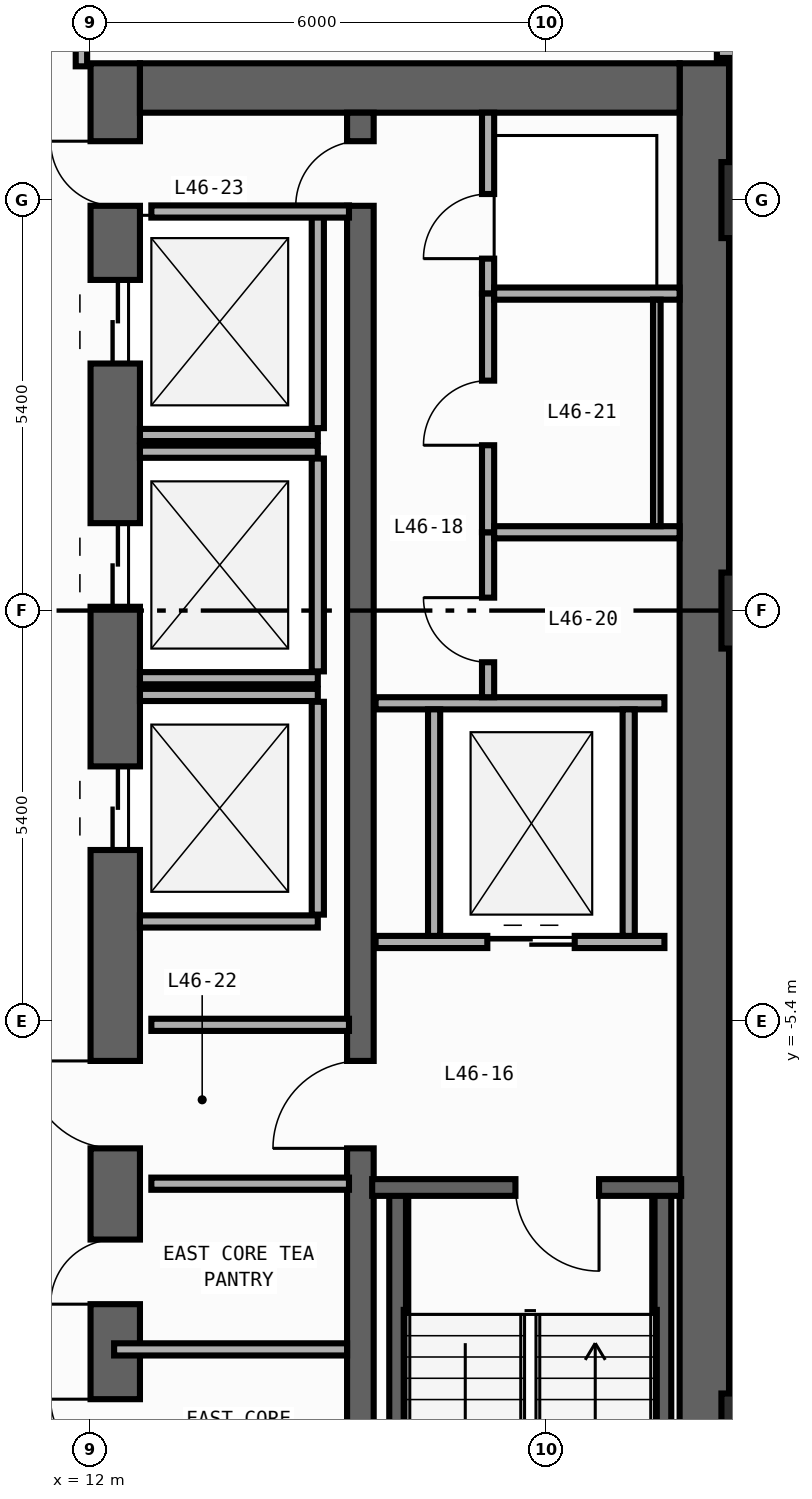
"""IFC4 building model, lengths in metres.
Left out: names, types, materials, properties, quantities, classifications, styles, units other than length and angle.
Written with IfcOpenShell. Run it as: python <this file> out.ifc"""

import sys

from ifc_helpers import new_model, si_unit, direction, frame, frame_2d, origin, origin_2d, place, context, subcontext, project, spatial, rectangle, extrude, element, fill, save


model = new_model("IFC4")
c1 = context("Model", 3, precision=1e-05, world=origin(), true_north=direction((0.0, 1.0)))
c2 = subcontext(c1, "Body", "Model", "MODEL_VIEW")
j1 = project(units=[si_unit("LENGTHUNIT", "METRE"), si_unit("PLANEANGLEUNIT", "RADIAN")], contexts=[c1])
p1 = place(None, origin())
s1 = spatial("IfcSite", under=j1, at=p1, CompositionType="ELEMENT")
p2 = place(p1, origin())
s2 = spatial("IfcBuilding", under=s1, at=p2, CompositionType="ELEMENT")
p3 = place(p2, frame((0.0, 0.0, 199.2)))
s3 = spatial("IfcBuildingStorey", under=s2, at=p3, CompositionType="ELEMENT", Elevation=199.2)
p4 = place(p3, frame((12.325, -19.8, 0.0), z_axis=(0.0, 0.0, 1.0), x_axis=(0.0, 1.0, 0.0)))
e1 = element("IfcWall", 1, at=p4, inside=s3, PredefinedType="SHEAR", context=c2, shape_type="SweptSolid", body=[
    extrude(rectangle(XDim=27.0, YDim=0.65, at=frame_2d((13.5, 0.0))), origin(), (0.0, 0.0, 1.0), 3.54),
])
p5 = place(p4, frame((23.05, 0.0, 0.0)))
e2 = element("IfcOpeningElement", 2, at=p5, cuts=e1, PredefinedType="OPENING", context=c2, shape_type="SweptSolid", body=[
    extrude(rectangle(XDim=1.1, YDim=2.2, at=frame_2d((0.55, 1.1))), frame((0.0, 0.335, 0.0), z_axis=(0.0, -1.0, 0.0), x_axis=(1.0, 0.0, 0.0)), (0.0, 0.0, 1.0), 0.67),
])
p6 = place(p4, frame((19.85, 0.0, 0.0)))
e3 = element("IfcOpeningElement", 3, at=p6, cuts=e1, PredefinedType="OPENING", context=c2, shape_type="SweptSolid", body=[
    extrude(rectangle(XDim=1.1, YDim=2.2, at=frame_2d((0.55, 1.1))), frame((0.0, 0.335, 0.0), z_axis=(0.0, -1.0, 0.0), x_axis=(1.0, 0.0, 0.0)), (0.0, 0.0, 1.0), 0.67),
])
p7 = place(p4, frame((16.65, 0.0, 0.0)))
e4 = element("IfcOpeningElement", 4, at=p7, cuts=e1, PredefinedType="OPENING", context=c2, shape_type="SweptSolid", body=[
    extrude(rectangle(XDim=1.1, YDim=2.2, at=frame_2d((0.55, 1.1))), frame((0.0, 0.335, 0.0), z_axis=(0.0, -1.0, 0.0), x_axis=(1.0, 0.0, 0.0)), (0.0, 0.0, 1.0), 0.67),
])
p8 = place(p4, frame((6.275, 0.0, 0.0)))
e5 = element("IfcOpeningElement", 5, at=p8, cuts=e1, PredefinedType="OPENING", context=c2, shape_type="SweptSolid", body=[
    extrude(rectangle(XDim=0.85, YDim=2.1, at=frame_2d((0.425, 1.05))), frame((0.0, 0.335, 0.0), z_axis=(0.0, -1.0, 0.0), x_axis=(1.0, 0.0, 0.0)), (0.0, 0.0, 1.0), 0.67),
])
p9 = place(p4, frame((8.575, 0.0, 0.0)))
e6 = element("IfcOpeningElement", 6, at=p9, cuts=e1, PredefinedType="OPENING", context=c2, shape_type="SweptSolid", body=[
    extrude(rectangle(XDim=0.85, YDim=2.1, at=frame_2d((0.425, 1.05))), frame((0.0, 0.335, 0.0), z_axis=(0.0, -1.0, 0.0), x_axis=(1.0, 0.0, 0.0)), (0.0, 0.0, 1.0), 0.67),
])
p10 = place(p4, frame((10.675, 0.0, 0.0)))
e7 = element("IfcOpeningElement", 7, at=p10, cuts=e1, PredefinedType="OPENING", context=c2, shape_type="SweptSolid", body=[
    extrude(rectangle(XDim=0.85, YDim=2.1, at=frame_2d((0.425, 1.05))), frame((0.0, 0.335, 0.0), z_axis=(0.0, -1.0, 0.0), x_axis=(1.0, 0.0, 0.0)), (0.0, 0.0, 1.0), 0.67),
])
p11 = place(p4, frame((12.725, 0.0, 0.0)))
e8 = element("IfcOpeningElement", 8, at=p11, cuts=e1, PredefinedType="OPENING", context=c2, shape_type="SweptSolid", body=[
    extrude(rectangle(XDim=1.15, YDim=2.2, at=frame_2d((0.575, 1.1))), frame((0.0, 0.335, 0.0), z_axis=(0.0, -1.0, 0.0), x_axis=(1.0, 0.0, 0.0)), (0.0, 0.0, 1.0), 0.67),
])
p12 = place(p4, frame((25.125, 0.0, 0.0)))
e9 = element("IfcOpeningElement", 9, at=p12, cuts=e1, PredefinedType="OPENING", context=c2, shape_type="SweptSolid", body=[
    extrude(rectangle(XDim=0.85, YDim=2.1, at=frame_2d((0.425, 1.05))), frame((0.0, 0.335, 0.0), z_axis=(0.0, -1.0, 0.0), x_axis=(1.0, 0.0, 0.0)), (0.0, 0.0, 1.0), 0.67),
])
p13 = place(p3, frame((20.075, -19.8, 0.0), z_axis=(0.0, 0.0, 1.0), x_axis=(0.0, 1.0, 0.0)))
e10 = element("IfcWall", 10, at=p13, inside=s3, PredefinedType="SHEAR", context=c2, shape_type="SweptSolid", body=[
    extrude(rectangle(XDim=27.0, YDim=0.65, at=frame_2d((13.5, 0.0))), origin(), (0.0, 0.0, 1.0), 3.54),
])
p14 = place(p3, frame((12.65, 6.875, 0.0), z_axis=(0.0, 0.0, 1.0), x_axis=(1.0, 0.0, 0.0)))
e11 = element("IfcWall", 11, at=p14, inside=s3, PredefinedType="SHEAR", context=c2, shape_type="SweptSolid", body=[
    extrude(rectangle(XDim=7.1, YDim=0.65, at=frame_2d((3.55, 0.0))), origin(), (0.0, 0.0, 1.0), 3.54),
])
p15 = place(p3, frame((15.55, -19.15, 0.0), z_axis=(0.0, 0.0, 1.0), x_axis=(0.0, 1.0, 0.0)))
e12 = element("IfcWall", 12, at=p15, inside=s3, PredefinedType="SHEAR", context=c2, shape_type="SweptSolid", body=[
    extrude(rectangle(XDim=25.7, YDim=0.35, at=frame_2d((12.85, 0.0))), origin(), (0.0, 0.0, 1.0), 3.54),
])
p16 = place(p15, frame((12.075, 0.0, 0.0)))
e13 = element("IfcOpeningElement", 13, at=p16, cuts=e12, PredefinedType="OPENING", context=c2, shape_type="SweptSolid", body=[
    extrude(rectangle(XDim=1.15, YDim=2.2, at=frame_2d((0.575, 1.1))), frame((0.0, 0.185, 0.0), z_axis=(0.0, -1.0, 0.0), x_axis=(1.0, 0.0, 0.0)), (0.0, 0.0, 1.0), 0.37),
])
p17 = place(p15, frame((24.475, 0.0, 0.0)))
e14 = element("IfcOpeningElement", 14, at=p17, cuts=e12, PredefinedType="OPENING", context=c2, shape_type="SweptSolid", body=[
    extrude(rectangle(XDim=0.85, YDim=2.1, at=frame_2d((0.425, 1.05))), frame((0.0, 0.185, 0.0), z_axis=(0.0, -1.0, 0.0), x_axis=(1.0, 0.0, 0.0)), (0.0, 0.0, 1.0), 0.37),
])
for number, where, z_axis, x_axis in (
    (15, (16.04, -19.01, 0.0), (0.0, 0.0, 1.0), (0.0, 1.0, 0.0)),
    (16, (19.53, -19.01, 0.0), (0.0, 0.0, 1.0), (0.0, 1.0, 0.0)),
):
    element("IfcWall", number, at=place(p3, frame(where, z_axis=z_axis, x_axis=x_axis)), inside=s3, PredefinedType="SHEAR", context=c2, shape_type="SweptSolid", body=[
        extrude(rectangle(XDim=11.42, YDim=0.22, at=frame_2d((5.71, 0.0))), origin(), (0.0, 0.0, 1.0), 3.54),
    ])
p18 = place(p3, frame((19.77, -7.59, 0.0), z_axis=(0.0, 0.0, 1.0), x_axis=(-1.0, 0.0, 0.0)))
e17 = element("IfcWall", 17, at=p18, inside=s3, PredefinedType="SHEAR", context=c2, shape_type="SweptSolid", body=[
    extrude(rectangle(XDim=4.065, YDim=0.22, at=frame_2d((2.032, 0.0))), origin(), (0.0, 0.0, 1.0), 3.54),
])
p19 = place(p18, frame((1.08, 0.0, 0.0)))
e18 = element("IfcOpeningElement", 18, at=p19, cuts=e17, PredefinedType="OPENING", context=c2, shape_type="SweptSolid", body=[
    extrude(rectangle(XDim=1.1, YDim=2.2, at=frame_2d((0.55, 1.1))), frame((0.0, 0.12, 0.0), z_axis=(0.0, -1.0, 0.0), x_axis=(1.0, 0.0, 0.0)), (0.0, 0.0, 1.0), 0.24),
])
for number, where, z_axis, x_axis in (
    (19, (20.8, -10.8, 0.0), (0.0, 0.0, 1.0), (1.0, 0.0, 0.0)),
    (20, (20.8, 0.0, 0.0), (0.0, 0.0, 1.0), (1.0, 0.0, 0.0)),
    (21, (20.8, 5.4, 0.0), (0.0, 0.0, 1.0), (1.0, 0.0, 0.0)),
):
    element("IfcColumn", number, at=place(p3, frame(where, z_axis=z_axis, x_axis=x_axis)), inside=s3, PredefinedType="COLUMN", context=c2, shape_type="SweptSolid", body=[
        extrude(rectangle(XDim=1.0, YDim=1.0, at=origin_2d()), origin(), (0.0, 0.0, 1.0), 3.8),
    ])
p20 = place(p3, frame((12.65, 2.31, 0.0), z_axis=(0.0, 0.0, 1.0), x_axis=(1.0, 0.0, 0.0)))
e22 = element("IfcWall", 22, at=p20, inside=s3, PredefinedType="STANDARD", context=c2, shape_type="SweptSolid", body=[
    extrude(rectangle(XDim=2.34, YDim=0.16, at=frame_2d((1.17, 0.0))), origin(), (0.0, 0.0, 1.0), 3.54),
])
p21 = place(p3, frame((14.99, 2.4, 0.0), z_axis=(0.0, 0.0, 1.0), x_axis=(0.0, 1.0, 0.0)))
e23 = element("IfcWall", 23, at=p21, inside=s3, PredefinedType="STANDARD", context=c2, shape_type="SweptSolid", body=[
    extrude(rectangle(XDim=2.8, YDim=0.16, at=frame_2d((1.4, 0.0))), origin(), (0.0, 0.0, 1.0), 3.54),
])
for number, where, z_axis, x_axis in (
    (24, (12.65, -0.89, 0.0), (0.0, 0.0, 1.0), (1.0, 0.0, 0.0)),
    (25, (12.65, 2.09, 0.0), (0.0, 0.0, 1.0), (1.0, 0.0, 0.0)),
):
    element("IfcWall", number, at=place(p3, frame(where, z_axis=z_axis, x_axis=x_axis)), inside=s3, PredefinedType="STANDARD", context=c2, shape_type="SweptSolid", body=[
        extrude(rectangle(XDim=2.34, YDim=0.16, at=frame_2d((1.17, 0.0))), origin(), (0.0, 0.0, 1.0), 3.54),
    ])
p22 = place(p3, frame((14.99, -0.8, 0.0), z_axis=(0.0, 0.0, 1.0), x_axis=(0.0, 1.0, 0.0)))
e26 = element("IfcWall", 26, at=p22, inside=s3, PredefinedType="STANDARD", context=c2, shape_type="SweptSolid", body=[
    extrude(rectangle(XDim=2.8, YDim=0.16, at=frame_2d((1.4, 0.0))), origin(), (0.0, 0.0, 1.0), 3.54),
])
for number, where, z_axis, x_axis in (
    (27, (12.65, -4.09, 0.0), (0.0, 0.0, 1.0), (1.0, 0.0, 0.0)),
    (28, (12.65, -1.11, 0.0), (0.0, 0.0, 1.0), (1.0, 0.0, 0.0)),
):
    element("IfcWall", number, at=place(p3, frame(where, z_axis=z_axis, x_axis=x_axis)), inside=s3, PredefinedType="STANDARD", context=c2, shape_type="SweptSolid", body=[
        extrude(rectangle(XDim=2.34, YDim=0.16, at=frame_2d((1.17, 0.0))), origin(), (0.0, 0.0, 1.0), 3.54),
    ])
p23 = place(p3, frame((14.99, -4.0, 0.0), z_axis=(0.0, 0.0, 1.0), x_axis=(0.0, 1.0, 0.0)))
e29 = element("IfcWall", 29, at=p23, inside=s3, PredefinedType="STANDARD", context=c2, shape_type="SweptSolid", body=[
    extrude(rectangle(XDim=2.8, YDim=0.16, at=frame_2d((1.4, 0.0))), origin(), (0.0, 0.0, 1.0), 3.54),
])
p24 = place(p3, frame((15.75, -4.36, 0.0), z_axis=(0.0, 0.0, 1.0), x_axis=(1.0, 0.0, 0.0)))
e30 = element("IfcWall", 30, at=p24, inside=s3, PredefinedType="STANDARD", context=c2, shape_type="SweptSolid", body=[
    extrude(rectangle(XDim=3.8, YDim=0.16, at=frame_2d((1.9, 0.0))), origin(), (0.0, 0.0, 1.0), 3.54),
])
p25 = place(p24, frame((1.47, 0.0, 0.0)))
e31 = element("IfcOpeningElement", 31, at=p25, cuts=e30, PredefinedType="OPENING", context=c2, shape_type="SweptSolid", body=[
    extrude(rectangle(XDim=1.15, YDim=2.2, at=frame_2d((0.575, 1.1))), frame((0.0, 0.09, 0.0), z_axis=(0.0, -1.0, 0.0), x_axis=(1.0, 0.0, 0.0)), (0.0, 0.0, 1.0), 0.18),
])
p26 = place(p3, frame((15.75, -1.22, 0.0), z_axis=(0.0, 0.0, 1.0), x_axis=(1.0, 0.0, 0.0)))
e32 = element("IfcWall", 32, at=p26, inside=s3, PredefinedType="STANDARD", context=c2, shape_type="SweptSolid", body=[
    extrude(rectangle(XDim=3.8, YDim=0.16, at=frame_2d((1.9, 0.0))), origin(), (0.0, 0.0, 1.0), 3.54),
])
for number, where, z_axis, x_axis in (
    (33, (16.52, -4.28, 0.0), (0.0, 0.0, 1.0), (0.0, 1.0, 0.0)),
    (34, (19.08, -4.28, 0.0), (0.0, 0.0, 1.0), (0.0, 1.0, 0.0)),
):
    element("IfcWall", number, at=place(p3, frame(where, z_axis=z_axis, x_axis=x_axis)), inside=s3, PredefinedType="STANDARD", context=c2, shape_type="SweptSolid", body=[
        extrude(rectangle(XDim=2.98, YDim=0.16, at=frame_2d((1.49, 0.0))), origin(), (0.0, 0.0, 1.0), 3.54),
    ])
for number, where, z_axis, x_axis in (
    (35, (12.8, -5.45, 0.0), (0.0, 0.0, 1.0), (1.0, 0.0, 0.0)),
    (36, (12.8, -7.54, 0.0), (0.0, 0.0, 1.0), (1.0, 0.0, 0.0)),
    (37, (12.8, 5.25, 0.0), (0.0, 0.0, 1.0), (1.0, 0.0, 0.0)),
):
    element("IfcWall", number, at=place(p3, frame(where, z_axis=z_axis, x_axis=x_axis)), inside=s3, PredefinedType="STANDARD", context=c2, shape_type="SweptSolid", body=[
        extrude(rectangle(XDim=2.6, YDim=0.16, at=frame_2d((1.3, 0.0))), origin(), (0.0, 0.0, 1.0), 3.54),
    ])
p27 = place(p3, frame((17.23, 4.17, 0.0), z_axis=(0.0, 0.0, 1.0), x_axis=(0.0, 1.0, 0.0)))
e38 = element("IfcWall", 38, at=p27, inside=s3, PredefinedType="PARTITIONING", context=c2, shape_type="SweptSolid", body=[
    extrude(rectangle(XDim=2.38, YDim=0.16, at=frame_2d((1.19, 0.0))), origin(), (0.0, 0.0, 1.0), 3.54),
])
p28 = place(p27, frame((0.46, 0.0, 0.0)))
e39 = element("IfcOpeningElement", 39, at=p28, cuts=e38, PredefinedType="OPENING", context=c2, shape_type="SweptSolid", body=[
    extrude(rectangle(XDim=0.85, YDim=2.1, at=frame_2d((0.425, 1.05))), frame((0.0, 0.09, 0.0), z_axis=(0.0, -1.0, 0.0), x_axis=(1.0, 0.0, 0.0)), (0.0, 0.0, 1.0), 0.18),
])
p29 = place(p3, frame((17.23, -1.14, 0.0), z_axis=(0.0, 0.0, 1.0), x_axis=(0.0, 1.0, 0.0)))
e40 = element("IfcWall", 40, at=p29, inside=s3, PredefinedType="PARTITIONING", context=c2, shape_type="SweptSolid", body=[
    extrude(rectangle(XDim=2.17, YDim=0.16, at=frame_2d((1.085, 0.0))), origin(), (0.0, 0.0, 1.0), 3.54),
])
p30 = place(p29, frame((0.46, 0.0, 0.0)))
e41 = element("IfcOpeningElement", 41, at=p30, cuts=e40, PredefinedType="OPENING", context=c2, shape_type="SweptSolid", body=[
    extrude(rectangle(XDim=0.85, YDim=2.1, at=frame_2d((0.425, 1.05))), frame((0.0, 0.09, 0.0), z_axis=(0.0, -1.0, 0.0), x_axis=(1.0, 0.0, 0.0)), (0.0, 0.0, 1.0), 0.18),
])
p31 = place(p3, frame((17.23, 1.03, 0.0), z_axis=(0.0, 0.0, 1.0), x_axis=(0.0, 1.0, 0.0)))
e42 = element("IfcWall", 42, at=p31, inside=s3, PredefinedType="PARTITIONING", context=c2, shape_type="SweptSolid", body=[
    extrude(rectangle(XDim=3.14, YDim=0.16, at=frame_2d((1.57, 0.0))), origin(), (0.0, 0.0, 1.0), 3.54),
])
p32 = place(p31, frame((1.145, 0.0, 0.0)))
e43 = element("IfcOpeningElement", 43, at=p32, cuts=e42, PredefinedType="OPENING", context=c2, shape_type="SweptSolid", body=[
    extrude(rectangle(XDim=0.85, YDim=2.1, at=frame_2d((0.425, 1.05))), frame((0.0, 0.09, 0.0), z_axis=(0.0, -1.0, 0.0), x_axis=(1.0, 0.0, 0.0)), (0.0, 0.0, 1.0), 0.18),
])
for number, where, z_axis, x_axis in (
    (44, (17.31, 4.17, 0.0), (0.0, 0.0, 1.0), (1.0, 0.0, 0.0)),
    (45, (17.31, 1.03, 0.0), (0.0, 0.0, 1.0), (1.0, 0.0, 0.0)),
):
    element("IfcWall", number, at=place(p3, frame(where, z_axis=z_axis, x_axis=x_axis)), inside=s3, PredefinedType="PARTITIONING", context=c2, shape_type="SweptSolid", body=[
        extrude(rectangle(XDim=2.44, YDim=0.16, at=frame_2d((1.22, 0.0))), origin(), (0.0, 0.0, 1.0), 3.54),
    ])
p33 = place(p3, frame((12.31, -9.72, 0.0), z_axis=(0.0, 0.0, 1.0), x_axis=(1.0, 0.0, 0.0)))
e46 = element("IfcWall", 46, at=p33, inside=s3, PredefinedType="PARTITIONING", context=c2, shape_type="SweptSolid", body=[
    extrude(rectangle(XDim=3.065, YDim=0.16, at=frame_2d((1.532, 0.0))), origin(), (0.0, 0.0, 1.0), 3.54),
])
p34 = place(p3, frame((11.88, 7.16, 0.0), z_axis=(0.0, 0.0, 1.0), x_axis=(0.0, 1.0, 0.0)))
e47 = element("IfcWall", 47, at=p34, inside=s3, PredefinedType="PARTITIONING", context=c2, shape_type="SweptSolid", body=[
    extrude(rectangle(XDim=8.855, YDim=0.15, at=frame_2d((4.427, 0.0))), origin(), (0.0, 0.0, 1.0), 3.54),
])
p35 = place(p34, frame((0.46, 0.0, 0.0)))
e48 = element("IfcOpeningElement", 48, at=p35, cuts=e47, PredefinedType="OPENING", context=c2, shape_type="SweptSolid", body=[
    extrude(rectangle(XDim=0.9, YDim=2.15, at=frame_2d((0.45, 1.075))), frame((0.0, 0.085, 0.0), z_axis=(0.0, -1.0, 0.0), x_axis=(1.0, 0.0, 0.0)), (0.0, 0.0, 1.0), 0.17),
])
p36 = place(p3, frame((20.24, 7.34, 0.0), z_axis=(0.0, 0.0, 1.0), x_axis=(1.0, 0.0, 0.0)))
e49 = element("IfcWall", 49, at=p36, inside=s3, PredefinedType="PARTITIONING", context=c2, shape_type="SweptSolid", body=[
    extrude(rectangle(XDim=2.215, YDim=0.14, at=frame_2d((1.107, 0.0))), origin(), (0.0, 0.0, 1.0), 3.54),
])
p37 = place(p36, frame((0.905, 0.0, 0.0)))
e50 = element("IfcOpeningElement", 50, at=p37, cuts=e49, PredefinedType="OPENING", context=c2, shape_type="SweptSolid", body=[
    extrude(rectangle(XDim=0.85, YDim=2.1, at=frame_2d((0.425, 1.05))), frame((0.0, 0.08, 0.0), z_axis=(0.0, -1.0, 0.0), x_axis=(1.0, 0.0, 0.0)), (0.0, 0.0, 1.0), 0.16),
])
p38 = place(p3, frame((19.45, 4.09, 0.0), z_axis=(0.0, 0.0, 1.0), x_axis=(0.0, -1.0, 0.0)))
e51 = element("IfcWall", 51, at=p38, inside=s3, PredefinedType="PARTITIONING", context=c2, shape_type="SweptSolid", body=[
    extrude(rectangle(XDim=2.98, YDim=0.1, at=frame_2d((1.49, 0.0))), origin(), (0.0, 0.0, 1.0), 3.54),
])
p39 = place(p19, origin())
e52 = element("IfcDoor", 52, at=p39, inside=s3, OperationType="SINGLE_SWING_LEFT", PredefinedType="DOOR", context=c2, shape_type="SweptSolid", body=[
    extrude(rectangle(XDim=1.1, YDim=2.2, at=frame_2d((0.55, 1.1))), frame((0.0, 0.025, 0.0), z_axis=(0.0, -1.0, 0.0), x_axis=(1.0, 0.0, 0.0)), (0.0, 0.0, 1.0), 0.05),
])
fill(e18, e52)
p40 = place(p5, origin())
e53 = element("IfcDoor", 53, at=p40, inside=s3, OperationType="DOUBLE_DOOR_SLIDING", PredefinedType="DOOR", context=c2, shape_type="SweptSolid", body=[
    extrude(rectangle(XDim=1.1, YDim=2.2, at=frame_2d((0.55, 1.1))), frame((0.0, 0.025, 0.0), z_axis=(0.0, -1.0, 0.0), x_axis=(1.0, 0.0, 0.0)), (0.0, 0.0, 1.0), 0.05),
])
fill(e2, e53)
p41 = place(p6, origin())
e54 = element("IfcDoor", 54, at=p41, inside=s3, OperationType="DOUBLE_DOOR_SLIDING", PredefinedType="DOOR", context=c2, shape_type="SweptSolid", body=[
    extrude(rectangle(XDim=1.1, YDim=2.2, at=frame_2d((0.55, 1.1))), frame((0.0, 0.025, 0.0), z_axis=(0.0, -1.0, 0.0), x_axis=(1.0, 0.0, 0.0)), (0.0, 0.0, 1.0), 0.05),
])
fill(e3, e54)
p42 = place(p7, origin())
e55 = element("IfcDoor", 55, at=p42, inside=s3, OperationType="DOUBLE_DOOR_SLIDING", PredefinedType="DOOR", context=c2, shape_type="SweptSolid", body=[
    extrude(rectangle(XDim=1.1, YDim=2.2, at=frame_2d((0.55, 1.1))), frame((0.0, 0.025, 0.0), z_axis=(0.0, -1.0, 0.0), x_axis=(1.0, 0.0, 0.0)), (0.0, 0.0, 1.0), 0.05),
])
fill(e4, e55)
p43 = place(p9, origin())
e56 = element("IfcDoor", 56, at=p43, inside=s3, OperationType="SINGLE_SWING_RIGHT", PredefinedType="DOOR", context=c2, shape_type="SweptSolid", body=[
    extrude(rectangle(XDim=0.85, YDim=2.1, at=frame_2d((0.425, 1.05))), frame((0.0, 0.025, 0.0), z_axis=(0.0, -1.0, 0.0), x_axis=(1.0, 0.0, 0.0)), (0.0, 0.0, 1.0), 0.05),
])
fill(e6, e56)
p44 = place(p10, origin())
e57 = element("IfcDoor", 57, at=p44, inside=s3, OperationType="SINGLE_SWING_LEFT", PredefinedType="DOOR", context=c2, shape_type="SweptSolid", body=[
    extrude(rectangle(XDim=0.85, YDim=2.1, at=frame_2d((0.425, 1.05))), frame((0.0, 0.025, 0.0), z_axis=(0.0, -1.0, 0.0), x_axis=(1.0, 0.0, 0.0)), (0.0, 0.0, 1.0), 0.05),
])
fill(e7, e57)
p45 = place(p11, origin())
e58 = element("IfcDoor", 58, at=p45, inside=s3, OperationType="SINGLE_SWING_RIGHT", PredefinedType="DOOR", context=c2, shape_type="SweptSolid", body=[
    extrude(rectangle(XDim=1.15, YDim=2.2, at=frame_2d((0.575, 1.1))), frame((0.0, 0.025, 0.0), z_axis=(0.0, -1.0, 0.0), x_axis=(1.0, 0.0, 0.0)), (0.0, 0.0, 1.0), 0.05),
])
fill(e8, e58)
p46 = place(p16, origin())
e59 = element("IfcDoor", 59, at=p46, inside=s3, OperationType="SINGLE_SWING_LEFT", PredefinedType="DOOR", context=c2, shape_type="SweptSolid", body=[
    extrude(rectangle(XDim=1.15, YDim=2.2, at=frame_2d((0.575, 1.1))), frame((0.0, 0.025, 0.0), z_axis=(0.0, -1.0, 0.0), x_axis=(1.0, 0.0, 0.0)), (0.0, 0.0, 1.0), 0.05),
])
fill(e13, e59)
p47 = place(p12, origin())
e60 = element("IfcDoor", 60, at=p47, inside=s3, OperationType="SINGLE_SWING_RIGHT", PredefinedType="DOOR", context=c2, shape_type="SweptSolid", body=[
    extrude(rectangle(XDim=0.85, YDim=2.1, at=frame_2d((0.425, 1.05))), frame((0.0, 0.025, 0.0), z_axis=(0.0, -1.0, 0.0), x_axis=(1.0, 0.0, 0.0)), (0.0, 0.0, 1.0), 0.05),
])
fill(e9, e60)
p48 = place(p17, origin())
e61 = element("IfcDoor", 61, at=p48, inside=s3, OperationType="SINGLE_SWING_LEFT", PredefinedType="DOOR", context=c2, shape_type="SweptSolid", body=[
    extrude(rectangle(XDim=0.85, YDim=2.1, at=frame_2d((0.425, 1.05))), frame((0.0, 0.025, 0.0), z_axis=(0.0, -1.0, 0.0), x_axis=(1.0, 0.0, 0.0)), (0.0, 0.0, 1.0), 0.05),
])
fill(e14, e61)
p49 = place(p25, origin())
e62 = element("IfcDoor", 62, at=p49, inside=s3, OperationType="DOUBLE_DOOR_SLIDING", PredefinedType="DOOR", context=c2, shape_type="SweptSolid", body=[
    extrude(rectangle(XDim=1.15, YDim=2.2, at=frame_2d((0.575, 1.1))), frame((0.0, 0.025, 0.0), z_axis=(0.0, -1.0, 0.0), x_axis=(1.0, 0.0, 0.0)), (0.0, 0.0, 1.0), 0.05),
])
fill(e31, e62)
p50 = place(p28, origin())
e63 = element("IfcDoor", 63, at=p50, inside=s3, OperationType="SINGLE_SWING_LEFT", PredefinedType="DOOR", context=c2, shape_type="SweptSolid", body=[
    extrude(rectangle(XDim=0.85, YDim=2.1, at=frame_2d((0.425, 1.05))), frame((0.0, 0.025, 0.0), z_axis=(0.0, -1.0, 0.0), x_axis=(1.0, 0.0, 0.0)), (0.0, 0.0, 1.0), 0.05),
])
fill(e39, e63)
p51 = place(p30, origin())
e64 = element("IfcDoor", 64, at=p51, inside=s3, OperationType="SINGLE_SWING_RIGHT", PredefinedType="DOOR", context=c2, shape_type="SweptSolid", body=[
    extrude(rectangle(XDim=0.85, YDim=2.1, at=frame_2d((0.425, 1.05))), frame((0.0, 0.025, 0.0), z_axis=(0.0, -1.0, 0.0), x_axis=(1.0, 0.0, 0.0)), (0.0, 0.0, 1.0), 0.05),
])
fill(e41, e64)
p52 = place(p32, origin())
e65 = element("IfcDoor", 65, at=p52, inside=s3, OperationType="SINGLE_SWING_LEFT", PredefinedType="DOOR", context=c2, shape_type="SweptSolid", body=[
    extrude(rectangle(XDim=0.85, YDim=2.1, at=frame_2d((0.425, 1.05))), frame((0.0, 0.025, 0.0), z_axis=(0.0, -1.0, 0.0), x_axis=(1.0, 0.0, 0.0)), (0.0, 0.0, 1.0), 0.05),
])
fill(e43, e65)
save(model, sys.argv[1])
